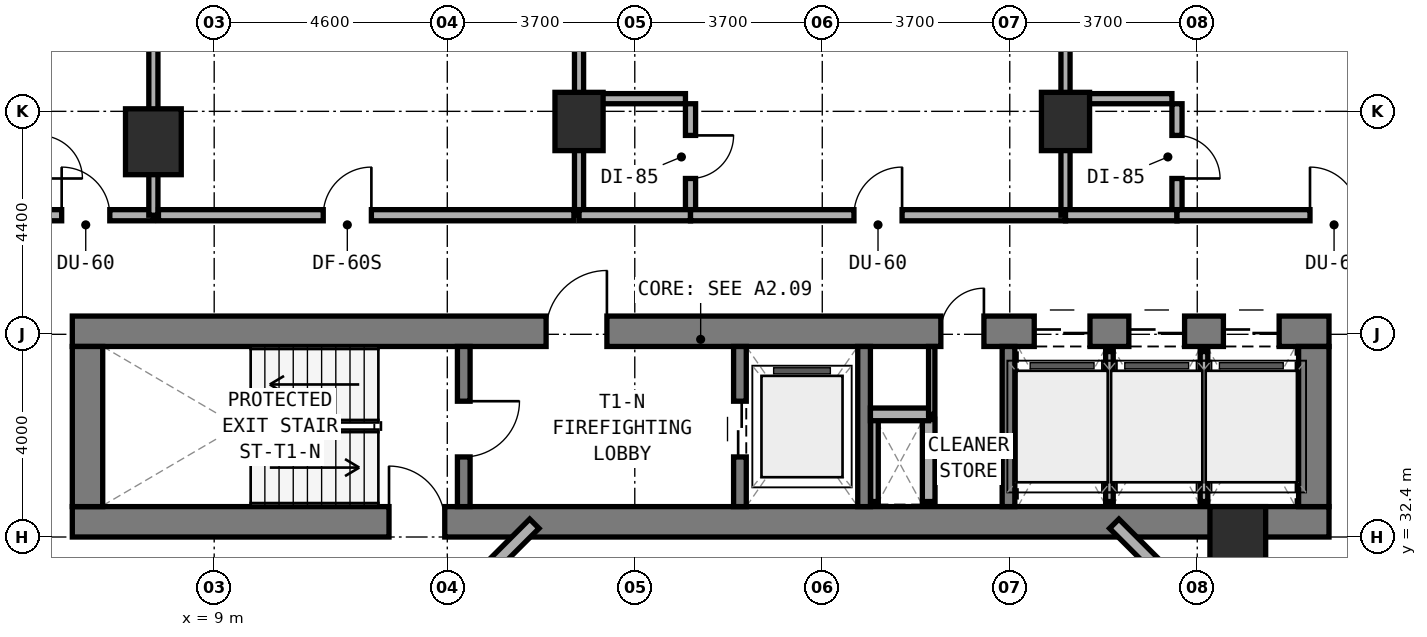
"""IFC4 building model, lengths in metres.
Left out: names, types, materials, properties, quantities, classifications, styles, units other than length and angle.
Written with IfcOpenShell. Run it as: python <this file> out.ifc"""

import sys

from ifc_helpers import new_model, si_unit, direction, frame, frame_2d, origin, origin_2d, place, context, subcontext, project, spatial, rectangle, extrude, element, fill, save


model = new_model("IFC4")
c1 = context("Model", 3, precision=1e-05, world=origin(), true_north=direction((0.0, 1.0)))
c2 = subcontext(c1, "Body", "Model", "MODEL_VIEW")
j1 = project(units=[si_unit("LENGTHUNIT", "METRE"), si_unit("PLANEANGLEUNIT", "RADIAN")], contexts=[c1])
p1 = place(None, origin())
s1 = spatial("IfcSite", under=j1, at=p1, CompositionType="ELEMENT")
p2 = place(p1, origin())
s2 = spatial("IfcBuilding", under=s1, at=p2, CompositionType="ELEMENT")
p3 = place(p2, frame((0.0, 0.0, 27.5)))
s3 = spatial("IfcBuildingStorey", under=s2, at=p3, CompositionType="ELEMENT", Elevation=27.5)
p4 = place(p3, frame((6.2, 32.7, 0.0), z_axis=(0.0, 0.0, 1.0), x_axis=(1.0, 0.0, 0.0)))
e1 = element("IfcWall", 1, at=p4, inside=s3, PredefinedType="SHEAR", context=c2, shape_type="SweptSolid", body=[
    extrude(rectangle(XDim=24.8, YDim=0.6, at=frame_2d((12.4, 0.0))), origin(), (0.0, 0.0, 1.0), 3.5),
])
p5 = place(p4, frame((6.25, 0.0, 0.0)))
e2 = element("IfcOpeningElement", 2, at=p5, cuts=e1, PredefinedType="OPENING", context=c2, shape_type="SweptSolid", body=[
    extrude(rectangle(XDim=1.1, YDim=2.15, at=frame_2d((0.55, 1.075))), frame((0.0, 0.31, 0.0), z_axis=(0.0, -1.0, 0.0), x_axis=(1.0, 0.0, 0.0)), (0.0, 0.0, 1.0), 0.62),
])
p6 = place(p3, frame((6.2, 36.46, 0.0), z_axis=(0.0, 0.0, 1.0), x_axis=(1.0, 0.0, 0.0)))
e3 = element("IfcWall", 3, at=p6, inside=s3, PredefinedType="SHEAR", context=c2, shape_type="SweptSolid", body=[
    extrude(rectangle(XDim=24.8, YDim=0.6, at=frame_2d((12.4, 0.0))), origin(), (0.0, 0.0, 1.0), 3.5),
])
p7 = place(p6, frame((9.35, 0.0, 0.0)))
e4 = element("IfcOpeningElement", 4, at=p7, cuts=e3, PredefinedType="OPENING", context=c2, shape_type="SweptSolid", body=[
    extrude(rectangle(XDim=1.2, YDim=2.15, at=frame_2d((0.6, 1.075))), frame((0.0, 0.31, 0.0), z_axis=(0.0, -1.0, 0.0), x_axis=(1.0, 0.0, 0.0)), (0.0, 0.0, 1.0), 0.62),
])
p8 = place(p6, frame((17.14, 0.0, 0.0)))
e5 = element("IfcOpeningElement", 5, at=p8, cuts=e3, PredefinedType="OPENING", context=c2, shape_type="SweptSolid", body=[
    extrude(rectangle(XDim=0.85, YDim=2.1, at=frame_2d((0.425, 1.05))), frame((0.0, 0.31, 0.0), z_axis=(0.0, -1.0, 0.0), x_axis=(1.0, 0.0, 0.0)), (0.0, 0.0, 1.0), 0.62),
])
p9 = place(p6, frame((18.983, 0.0, 0.0)))
e6 = element("IfcOpeningElement", 6, at=p9, cuts=e3, PredefinedType="OPENING", context=c2, shape_type="SweptSolid", body=[
    extrude(rectangle(XDim=1.1, YDim=2.15, at=frame_2d((0.55, 1.075))), frame((0.0, 0.31, 0.0), z_axis=(0.0, -1.0, 0.0), x_axis=(1.0, 0.0, 0.0)), (0.0, 0.0, 1.0), 0.62),
])
p10 = place(p6, frame((20.85, 0.0, 0.0)))
e7 = element("IfcOpeningElement", 7, at=p10, cuts=e3, PredefinedType="OPENING", context=c2, shape_type="SweptSolid", body=[
    extrude(rectangle(XDim=1.1, YDim=2.15, at=frame_2d((0.55, 1.075))), frame((0.0, 0.31, 0.0), z_axis=(0.0, -1.0, 0.0), x_axis=(1.0, 0.0, 0.0)), (0.0, 0.0, 1.0), 0.62),
])
p11 = place(p6, frame((22.716, 0.0, 0.0)))
e8 = element("IfcOpeningElement", 8, at=p11, cuts=e3, PredefinedType="OPENING", context=c2, shape_type="SweptSolid", body=[
    extrude(rectangle(XDim=1.1, YDim=2.15, at=frame_2d((0.55, 1.075))), frame((0.0, 0.31, 0.0), z_axis=(0.0, -1.0, 0.0), x_axis=(1.0, 0.0, 0.0)), (0.0, 0.0, 1.0), 0.62),
])
for number, where, z_axis, x_axis in (
    (9, (6.5, 33.0, 0.0), (0.0, 0.0, 1.0), (0.0, 1.0, 0.0)),
    (10, (30.7, 33.0, 0.0), (0.0, 0.0, 1.0), (0.0, 1.0, 0.0)),
):
    element("IfcWall", number, at=place(p3, frame(where, z_axis=z_axis, x_axis=x_axis)), inside=s3, PredefinedType="SHEAR", context=c2, shape_type="SweptSolid", body=[
        extrude(rectangle(XDim=3.16, YDim=0.6, at=frame_2d((1.58, 0.0))), origin(), (0.0, 0.0, 1.0), 3.5),
    ])
p12 = place(p3, frame((13.925, 33.0, 0.0), z_axis=(0.0, 0.0, 1.0), x_axis=(0.0, 1.0, 0.0)))
e11 = element("IfcWall", 11, at=p12, inside=s3, PredefinedType="STANDARD", context=c2, shape_type="SweptSolid", body=[
    extrude(rectangle(XDim=3.16, YDim=0.25, at=frame_2d((1.58, 0.0))), origin(), (0.0, 0.0, 1.0), 3.22),
])
p13 = place(p12, frame((0.98, 0.0, 0.0)))
e12 = element("IfcOpeningElement", 12, at=p13, cuts=e11, PredefinedType="OPENING", context=c2, shape_type="SweptSolid", body=[
    extrude(rectangle(XDim=1.1, YDim=2.15, at=frame_2d((0.55, 1.075))), frame((0.0, 0.135, 0.0), z_axis=(0.0, -1.0, 0.0), x_axis=(1.0, 0.0, 0.0)), (0.0, 0.0, 1.0), 0.27),
])
p14 = place(p3, frame((19.375, 33.0, 0.0), z_axis=(0.0, 0.0, 1.0), x_axis=(0.0, 1.0, 0.0)))
e13 = element("IfcWall", 13, at=p14, inside=s3, PredefinedType="STANDARD", context=c2, shape_type="SweptSolid", body=[
    extrude(rectangle(XDim=3.16, YDim=0.25, at=frame_2d((1.58, 0.0))), origin(), (0.0, 0.0, 1.0), 3.22),
])
p15 = place(p14, frame((0.98, 0.0, 0.0)))
e14 = element("IfcOpeningElement", 14, at=p15, cuts=e13, PredefinedType="OPENING", context=c2, shape_type="SweptSolid", body=[
    extrude(rectangle(XDim=1.1, YDim=2.15, at=frame_2d((0.55, 1.075))), frame((0.0, 0.135, 0.0), z_axis=(0.0, -1.0, 0.0), x_axis=(1.0, 0.0, 0.0)), (0.0, 0.0, 1.0), 0.27),
])
for number, where, z_axis, x_axis in (
    (15, (21.825, 33.0, 0.0), (0.0, 0.0, 1.0), (0.0, 1.0, 0.0)),
    (16, (24.675, 33.0, 0.0), (0.0, 0.0, 1.0), (0.0, 1.0, 0.0)),
):
    element("IfcWall", number, at=place(p3, frame(where, z_axis=z_axis, x_axis=x_axis)), inside=s3, PredefinedType="STANDARD", context=c2, shape_type="SweptSolid", body=[
        extrude(rectangle(XDim=3.16, YDim=0.25, at=frame_2d((1.58, 0.0))), origin(), (0.0, 0.0, 1.0), 3.22),
    ])
for number, where, z_axis, x_axis in (
    (17, (16.2, 40.6, 0.0), (0.0, 0.0, 1.0), (1.0, 0.0, 0.0)),
    (18, (25.8, 40.6, 0.0), (0.0, 0.0, 1.0), (1.0, 0.0, 0.0)),
):
    element("IfcColumn", number, at=place(p3, frame(where, z_axis=z_axis, x_axis=x_axis)), inside=s3, PredefinedType="COLUMN", context=c2, shape_type="SweptSolid", body=[
        extrude(rectangle(XDim=0.95, YDim=1.15, at=origin_2d()), origin(), (0.0, 0.0, 1.0), 3.5),
    ])
for number, where, z_axis, x_axis in (
    (19, (7.8, 40.2, 0.0), (0.0, 0.0, 1.0), (1.0, 0.0, 0.0)),
    (20, (29.2, 32.35, 0.0), (0.0, 0.0, 1.0), (1.0, 0.0, 0.0)),
):
    element("IfcColumn", number, at=place(p3, frame(where, z_axis=z_axis, x_axis=x_axis)), inside=s3, PredefinedType="COLUMN", context=c2, shape_type="SweptSolid", body=[
        extrude(rectangle(XDim=1.1, YDim=1.3, at=origin_2d()), origin(), (0.0, 0.0, 1.0), 3.5),
    ])
p16 = place(p3, frame((28.596, 30.828, 0.0), z_axis=(0.0, 0.0, 1.0), x_axis=(-0.707059717605, 0.707153841636, 0.0)))
e21 = element("IfcWall", 21, at=p16, inside=s3, PredefinedType="STANDARD", context=c2, shape_type="SweptSolid", body=[
    extrude(rectangle(XDim=2.594, YDim=0.26, at=frame_2d((1.297, 0.0))), origin(), (0.0, 0.0, 1.0), 3.22),
])
p17 = place(p3, frame((15.318, 32.662, 0.0), z_axis=(0.0, 0.0, 1.0), x_axis=(-0.707106781187, -0.707106781187, 0.0)))
e22 = element("IfcWall", 22, at=p17, inside=s3, PredefinedType="STANDARD", context=c2, shape_type="SweptSolid", body=[
    extrude(rectangle(XDim=2.594, YDim=0.26, at=frame_2d((1.297, 0.0))), origin(), (0.0, 0.0, 1.0), 3.22),
])
p18 = place(p3, frame((22.03, 33.1, 0.0), z_axis=(0.0, 0.0, 1.0), x_axis=(0.0, 1.0, 0.0)))
e23 = element("IfcWall", 23, at=p18, inside=s3, PredefinedType="PARTITIONING", context=c2, shape_type="SweptSolid", body=[
    extrude(rectangle(XDim=1.62, YDim=0.15, at=frame_2d((0.81, 0.0))), origin(), (0.0, 0.0, 1.0), 3.22),
])
p19 = place(p3, frame((23.1, 33.1, 0.0), z_axis=(0.0, 0.0, 1.0), x_axis=(0.0, 1.0, 0.0)))
e24 = element("IfcWall", 24, at=p19, inside=s3, PredefinedType="SOLIDWALL", context=c2, shape_type="SweptSolid", body=[
    extrude(rectangle(XDim=1.62, YDim=0.25, at=frame_2d((0.81, 0.0))), origin(), (0.0, 0.0, 1.0), 3.22),
])
p20 = place(p3, frame((21.95, 34.82, 0.0), z_axis=(0.0, 0.0, 1.0), x_axis=(1.0, 0.0, 0.0)))
e25 = element("IfcWall", 25, at=p20, inside=s3, PredefinedType="SOLIDWALL", context=c2, shape_type="SweptSolid", body=[
    extrude(rectangle(XDim=1.15, YDim=0.25, at=frame_2d((0.575, 0.0))), origin(), (0.0, 0.0, 1.0), 3.22),
])
p21 = place(p3, frame((23.16, 34.82, 0.0), z_axis=(0.0, 0.0, 1.0), x_axis=(0.0, 1.0, 0.0)))
e26 = element("IfcWall", 26, at=p21, inside=s3, PredefinedType="PARTITIONING", context=c2, shape_type="SweptSolid", body=[
    extrude(rectangle(XDim=1.34, YDim=0.125, at=frame_2d((0.67, 0.0))), origin(), (0.0, 0.0, 1.0), 3.22),
])
p22 = place(p3, frame((26.667, 33.1, 0.0), z_axis=(0.0, 0.0, 1.0), x_axis=(0.0, 1.0, 0.0)))
e27 = element("IfcWall", 27, at=p22, inside=s3, PredefinedType="PARTITIONING", context=c2, shape_type="SweptSolid", body=[
    extrude(rectangle(XDim=2.96, YDim=0.15, at=frame_2d((1.48, 0.0))), origin(), (0.0, 0.0, 1.0), 3.22),
])
p23 = place(p3, frame((28.533, 33.1, 0.0), z_axis=(0.0, 0.0, 1.0), x_axis=(0.0, 1.0, 0.0)))
e28 = element("IfcWall", 28, at=p23, inside=s3, PredefinedType="PARTITIONING", context=c2, shape_type="SweptSolid", body=[
    extrude(rectangle(XDim=2.96, YDim=0.15, at=frame_2d((1.48, 0.0))), origin(), (0.0, 0.0, 1.0), 2.395),
])
p24 = place(p3, frame((5.55, 38.75, 0.0), z_axis=(0.0, 0.0, 1.0), x_axis=(1.0, 0.0, 0.0)))
e29 = element("IfcWall", 29, at=p24, inside=s3, PredefinedType="SOLIDWALL", context=c2, shape_type="SweptSolid", body=[
    extrude(rectangle(XDim=2.25, YDim=0.22, at=frame_2d((1.125, 0.0))), origin(), (0.0, 0.0, 1.0), 2.395),
])
p25 = place(p24, frame((0.44, 0.0, 0.0)))
e30 = element("IfcOpeningElement", 30, at=p25, cuts=e29, PredefinedType="OPENING", context=c2, shape_type="SweptSolid", body=[
    extrude(rectangle(XDim=0.95, YDim=2.1, at=frame_2d((0.475, 1.05))), frame((0.0, 0.12, 0.0), z_axis=(0.0, -1.0, 0.0), x_axis=(1.0, 0.0, 0.0)), (0.0, 0.0, 1.0), 0.24),
])
p26 = place(p3, frame((7.8, 38.75, 0.0), z_axis=(0.0, 0.0, 1.0), x_axis=(0.0, 1.0, 0.0)))
e31 = element("IfcWall", 31, at=p26, inside=s3, PredefinedType="SOLIDWALL", context=c2, shape_type="SweptSolid", body=[
    extrude(rectangle(XDim=6.656, YDim=0.18, at=frame_2d((3.328, 0.0))), origin(), (0.0, 0.0, 1.0), 2.395),
])
p27 = place(p3, frame((7.9, 38.75, 0.0), z_axis=(0.0, 0.0, 1.0), x_axis=(1.0, 0.0, 0.0)))
e32 = element("IfcWall", 32, at=p27, inside=s3, PredefinedType="SOLIDWALL", context=c2, shape_type="SweptSolid", body=[
    extrude(rectangle(XDim=8.2, YDim=0.22, at=frame_2d((4.1, 0.0))), origin(), (0.0, 0.0, 1.0), 2.745),
])
p28 = place(p27, frame((3.252, 0.0, 0.0)))
e33 = element("IfcOpeningElement", 33, at=p28, cuts=e32, PredefinedType="OPENING", context=c2, shape_type="SweptSolid", body=[
    extrude(rectangle(XDim=0.95, YDim=2.1, at=frame_2d((0.475, 1.05))), frame((0.0, 0.12, 0.0), z_axis=(0.0, -1.0, 0.0), x_axis=(1.0, 0.0, 0.0)), (0.0, 0.0, 1.0), 0.24),
])
p29 = place(p3, frame((16.2, 38.75, 0.0), z_axis=(0.0, 0.0, 1.0), x_axis=(0.0, 1.0, 0.0)))
e34 = element("IfcWall", 34, at=p29, inside=s3, PredefinedType="SOLIDWALL", context=c2, shape_type="SweptSolid", body=[
    extrude(rectangle(XDim=8.19, YDim=0.18, at=frame_2d((4.095, 0.0))), origin(), (0.0, 0.0, 1.0), 2.395),
])
p30 = place(p3, frame((18.4, 38.85, 0.0), z_axis=(0.0, 0.0, 1.0), x_axis=(0.0, 1.0, 0.0)))
e35 = element("IfcWall", 35, at=p30, inside=s3, PredefinedType="PLUMBINGWALL", context=c2, shape_type="SweptSolid", body=[
    extrude(rectangle(XDim=2.1, YDim=0.2, at=frame_2d((1.05, 0.0))), origin(), (0.0, 0.0, 1.0), 2.745),
])
p31 = place(p30, frame((0.625, 0.0, 0.0)))
e36 = element("IfcOpeningElement", 36, at=p31, cuts=e35, PredefinedType="OPENING", context=c2, shape_type="SweptSolid", body=[
    extrude(rectangle(XDim=0.85, YDim=2.1, at=frame_2d((0.425, 1.05))), frame((0.0, 0.11, 0.0), z_axis=(0.0, -1.0, 0.0), x_axis=(1.0, 0.0, 0.0)), (0.0, 0.0, 1.0), 0.22),
])
p32 = place(p3, frame((16.3, 41.05, 0.0), z_axis=(0.0, 0.0, 1.0), x_axis=(1.0, 0.0, 0.0)))
e37 = element("IfcWall", 37, at=p32, inside=s3, PredefinedType="PLUMBINGWALL", context=c2, shape_type="SweptSolid", body=[
    extrude(rectangle(XDim=2.0, YDim=0.2, at=frame_2d((1.0, 0.0))), origin(), (0.0, 0.0, 1.0), 3.22),
])
p33 = place(p3, frame((16.2, 38.75, 0.0), z_axis=(0.0, 0.0, 1.0), x_axis=(1.0, 0.0, 0.0)))
e38 = element("IfcWall", 38, at=p33, inside=s3, PredefinedType="SOLIDWALL", context=c2, shape_type="SweptSolid", body=[
    extrude(rectangle(XDim=2.2, YDim=0.22, at=frame_2d((1.1, 0.0))), origin(), (0.0, 0.0, 1.0), 2.395),
])
p34 = place(p3, frame((18.4, 38.75, 0.0), z_axis=(0.0, 0.0, 1.0), x_axis=(1.0, 0.0, 0.0)))
e39 = element("IfcWall", 39, at=p34, inside=s3, PredefinedType="SOLIDWALL", context=c2, shape_type="SweptSolid", body=[
    extrude(rectangle(XDim=7.4, YDim=0.22, at=frame_2d((3.7, 0.0))), origin(), (0.0, 0.0, 1.0), 2.395),
])
p35 = place(p34, frame((3.225, 0.0, 0.0)))
e40 = element("IfcOpeningElement", 40, at=p35, cuts=e39, PredefinedType="OPENING", context=c2, shape_type="SweptSolid", body=[
    extrude(rectangle(XDim=0.95, YDim=2.1, at=frame_2d((0.475, 1.05))), frame((0.0, 0.12, 0.0), z_axis=(0.0, -1.0, 0.0), x_axis=(1.0, 0.0, 0.0)), (0.0, 0.0, 1.0), 0.24),
])
p36 = place(p3, frame((25.8, 38.75, 0.0), z_axis=(0.0, 0.0, 1.0), x_axis=(0.0, 1.0, 0.0)))
e41 = element("IfcWall", 41, at=p36, inside=s3, PredefinedType="SOLIDWALL", context=c2, shape_type="SweptSolid", body=[
    extrude(rectangle(XDim=8.19, YDim=0.18, at=frame_2d((4.095, 0.0))), origin(), (0.0, 0.0, 1.0), 2.395),
])
p37 = place(p3, frame((28.0, 38.85, 0.0), z_axis=(0.0, 0.0, 1.0), x_axis=(0.0, 1.0, 0.0)))
e42 = element("IfcWall", 42, at=p37, inside=s3, PredefinedType="PLUMBINGWALL", context=c2, shape_type="SweptSolid", body=[
    extrude(rectangle(XDim=2.1, YDim=0.2, at=frame_2d((1.05, 0.0))), origin(), (0.0, 0.0, 1.0), 2.745),
])
p38 = place(p37, frame((0.625, 0.0, 0.0)))
e43 = element("IfcOpeningElement", 43, at=p38, cuts=e42, PredefinedType="OPENING", context=c2, shape_type="SweptSolid", body=[
    extrude(rectangle(XDim=0.85, YDim=2.1, at=frame_2d((0.425, 1.05))), frame((0.0, 0.11, 0.0), z_axis=(0.0, -1.0, 0.0), x_axis=(1.0, 0.0, 0.0)), (0.0, 0.0, 1.0), 0.22),
])
p39 = place(p3, frame((25.9, 41.05, 0.0), z_axis=(0.0, 0.0, 1.0), x_axis=(1.0, 0.0, 0.0)))
e44 = element("IfcWall", 44, at=p39, inside=s3, PredefinedType="PLUMBINGWALL", context=c2, shape_type="SweptSolid", body=[
    extrude(rectangle(XDim=2.0, YDim=0.2, at=frame_2d((1.0, 0.0))), origin(), (0.0, 0.0, 1.0), 3.22),
])
p40 = place(p3, frame((25.8, 38.75, 0.0), z_axis=(0.0, 0.0, 1.0), x_axis=(1.0, 0.0, 0.0)))
e45 = element("IfcWall", 45, at=p40, inside=s3, PredefinedType="SOLIDWALL", context=c2, shape_type="SweptSolid", body=[
    extrude(rectangle(XDim=2.2, YDim=0.22, at=frame_2d((1.1, 0.0))), origin(), (0.0, 0.0, 1.0), 2.395),
])
p41 = place(p3, frame((28.0, 38.75, 0.0), z_axis=(0.0, 0.0, 1.0), x_axis=(1.0, 0.0, 0.0)))
e46 = element("IfcWall", 46, at=p41, inside=s3, PredefinedType="SOLIDWALL", context=c2, shape_type="SweptSolid", body=[
    extrude(rectangle(XDim=6.2, YDim=0.22, at=frame_2d((3.1, 0.0))), origin(), (0.0, 0.0, 1.0), 2.395),
])
p42 = place(p41, frame((2.625, 0.0, 0.0)))
e47 = element("IfcOpeningElement", 47, at=p42, cuts=e46, PredefinedType="OPENING", context=c2, shape_type="SweptSolid", body=[
    extrude(rectangle(XDim=0.95, YDim=2.1, at=frame_2d((0.475, 1.05))), frame((0.0, 0.12, 0.0), z_axis=(0.0, -1.0, 0.0), x_axis=(1.0, 0.0, 0.0)), (0.0, 0.0, 1.0), 0.24),
])
p43 = place(p13, frame((1.1, 0.0, 0.0), z_axis=(0.0, 0.0, 1.0), x_axis=(-1.0, 0.0, 0.0)))
e48 = element("IfcDoor", 48, at=p43, inside=s3, OperationType="SINGLE_SWING_LEFT", PredefinedType="DOOR", context=c2, shape_type="SweptSolid", body=[
    extrude(rectangle(XDim=1.1, YDim=2.15, at=frame_2d((0.55, 1.075))), frame((0.0, 0.025, 0.0), z_axis=(0.0, -1.0, 0.0), x_axis=(1.0, 0.0, 0.0)), (0.0, 0.0, 1.0), 0.05),
])
fill(e12, e48)
p44 = place(p7, origin())
e49 = element("IfcDoor", 49, at=p44, inside=s3, OperationType="SINGLE_SWING_RIGHT", PredefinedType="DOOR", context=c2, shape_type="SweptSolid", body=[
    extrude(rectangle(XDim=1.2, YDim=2.15, at=frame_2d((0.6, 1.075))), frame((0.0, 0.025, 0.0), z_axis=(0.0, -1.0, 0.0), x_axis=(1.0, 0.0, 0.0)), (0.0, 0.0, 1.0), 0.05),
])
fill(e4, e49)
p45 = place(p15, origin())
e50 = element("IfcDoor", 50, at=p45, inside=s3, OperationType="DOUBLE_DOOR_SLIDING", PredefinedType="DOOR", context=c2, shape_type="SweptSolid", body=[
    extrude(rectangle(XDim=1.1, YDim=2.15, at=frame_2d((0.55, 1.075))), frame((0.0, 0.025, 0.0), z_axis=(0.0, -1.0, 0.0), x_axis=(1.0, 0.0, 0.0)), (0.0, 0.0, 1.0), 0.05),
])
fill(e14, e50)
p46 = place(p8, origin())
e51 = element("IfcDoor", 51, at=p46, inside=s3, OperationType="SINGLE_SWING_RIGHT", PredefinedType="DOOR", context=c2, shape_type="SweptSolid", body=[
    extrude(rectangle(XDim=0.85, YDim=2.1, at=frame_2d((0.425, 1.05))), frame((0.0, 0.025, 0.0), z_axis=(0.0, -1.0, 0.0), x_axis=(1.0, 0.0, 0.0)), (0.0, 0.0, 1.0), 0.05),
])
fill(e5, e51)
p47 = place(p9, origin())
e52 = element("IfcDoor", 52, at=p47, inside=s3, OperationType="DOUBLE_DOOR_SLIDING", PredefinedType="DOOR", context=c2, shape_type="SweptSolid", body=[
    extrude(rectangle(XDim=1.1, YDim=2.15, at=frame_2d((0.55, 1.075))), frame((0.0, 0.025, 0.0), z_axis=(0.0, -1.0, 0.0), x_axis=(1.0, 0.0, 0.0)), (0.0, 0.0, 1.0), 0.05),
])
fill(e6, e52)
p48 = place(p10, origin())
e53 = element("IfcDoor", 53, at=p48, inside=s3, OperationType="DOUBLE_DOOR_SLIDING", PredefinedType="DOOR", context=c2, shape_type="SweptSolid", body=[
    extrude(rectangle(XDim=1.1, YDim=2.15, at=frame_2d((0.55, 1.075))), frame((0.0, 0.025, 0.0), z_axis=(0.0, -1.0, 0.0), x_axis=(1.0, 0.0, 0.0)), (0.0, 0.0, 1.0), 0.05),
])
fill(e7, e53)
p49 = place(p11, origin())
e54 = element("IfcDoor", 54, at=p49, inside=s3, OperationType="DOUBLE_DOOR_SLIDING", PredefinedType="DOOR", context=c2, shape_type="SweptSolid", body=[
    extrude(rectangle(XDim=1.1, YDim=2.15, at=frame_2d((0.55, 1.075))), frame((0.0, 0.025, 0.0), z_axis=(0.0, -1.0, 0.0), x_axis=(1.0, 0.0, 0.0)), (0.0, 0.0, 1.0), 0.05),
])
fill(e8, e54)
p50 = place(p5, origin())
e55 = element("IfcDoor", 55, at=p50, inside=s3, OperationType="SINGLE_SWING_LEFT", PredefinedType="DOOR", context=c2, shape_type="SweptSolid", body=[
    extrude(rectangle(XDim=1.1, YDim=2.15, at=frame_2d((0.55, 1.075))), frame((0.0, 0.025, 0.0), z_axis=(0.0, -1.0, 0.0), x_axis=(1.0, 0.0, 0.0)), (0.0, 0.0, 1.0), 0.05),
])
fill(e2, e55)
p51 = place(p25, origin())
e56 = element("IfcDoor", 56, at=p51, inside=s3, OperationType="SINGLE_SWING_LEFT", PredefinedType="DOOR", context=c2, shape_type="SweptSolid", body=[
    extrude(rectangle(XDim=0.95, YDim=2.1, at=frame_2d((0.475, 1.05))), frame((0.0, 0.025, 0.0), z_axis=(0.0, -1.0, 0.0), x_axis=(1.0, 0.0, 0.0)), (0.0, 0.0, 1.0), 0.05),
])
fill(e30, e56)
p52 = place(p28, origin())
e57 = element("IfcDoor", 57, at=p52, inside=s3, OperationType="SINGLE_SWING_RIGHT", PredefinedType="DOOR", context=c2, shape_type="SweptSolid", body=[
    extrude(rectangle(XDim=0.95, YDim=2.1, at=frame_2d((0.475, 1.05))), frame((0.0, 0.025, 0.0), z_axis=(0.0, -1.0, 0.0), x_axis=(1.0, 0.0, 0.0)), (0.0, 0.0, 1.0), 0.05),
])
fill(e33, e57)
p53 = place(p31, frame((0.85, 0.0, 0.0), z_axis=(0.0, 0.0, 1.0), x_axis=(-1.0, 0.0, 0.0)))
e58 = element("IfcDoor", 58, at=p53, inside=s3, OperationType="SINGLE_SWING_LEFT", PredefinedType="DOOR", context=c2, shape_type="SweptSolid", body=[
    extrude(rectangle(XDim=0.85, YDim=2.1, at=frame_2d((0.425, 1.05))), frame((0.0, 0.025, 0.0), z_axis=(0.0, -1.0, 0.0), x_axis=(1.0, 0.0, 0.0)), (0.0, 0.0, 1.0), 0.05),
])
fill(e36, e58)
p54 = place(p35, origin())
e59 = element("IfcDoor", 59, at=p54, inside=s3, OperationType="SINGLE_SWING_RIGHT", PredefinedType="DOOR", context=c2, shape_type="SweptSolid", body=[
    extrude(rectangle(XDim=0.95, YDim=2.1, at=frame_2d((0.475, 1.05))), frame((0.0, 0.025, 0.0), z_axis=(0.0, -1.0, 0.0), x_axis=(1.0, 0.0, 0.0)), (0.0, 0.0, 1.0), 0.05),
])
fill(e40, e59)
p55 = place(p38, frame((0.85, 0.0, 0.0), z_axis=(0.0, 0.0, 1.0), x_axis=(-1.0, 0.0, 0.0)))
e60 = element("IfcDoor", 60, at=p55, inside=s3, OperationType="SINGLE_SWING_RIGHT", PredefinedType="DOOR", context=c2, shape_type="SweptSolid", body=[
    extrude(rectangle(XDim=0.85, YDim=2.1, at=frame_2d((0.425, 1.05))), frame((0.0, 0.025, 0.0), z_axis=(0.0, -1.0, 0.0), x_axis=(1.0, 0.0, 0.0)), (0.0, 0.0, 1.0), 0.05),
])
fill(e43, e60)
p56 = place(p42, origin())
e61 = element("IfcDoor", 61, at=p56, inside=s3, OperationType="SINGLE_SWING_LEFT", PredefinedType="DOOR", context=c2, shape_type="SweptSolid", body=[
    extrude(rectangle(XDim=0.95, YDim=2.1, at=frame_2d((0.475, 1.05))), frame((0.0, 0.025, 0.0), z_axis=(0.0, -1.0, 0.0), x_axis=(1.0, 0.0, 0.0)), (0.0, 0.0, 1.0), 0.05),
])
fill(e47, e61)
save(model, sys.argv[1])
